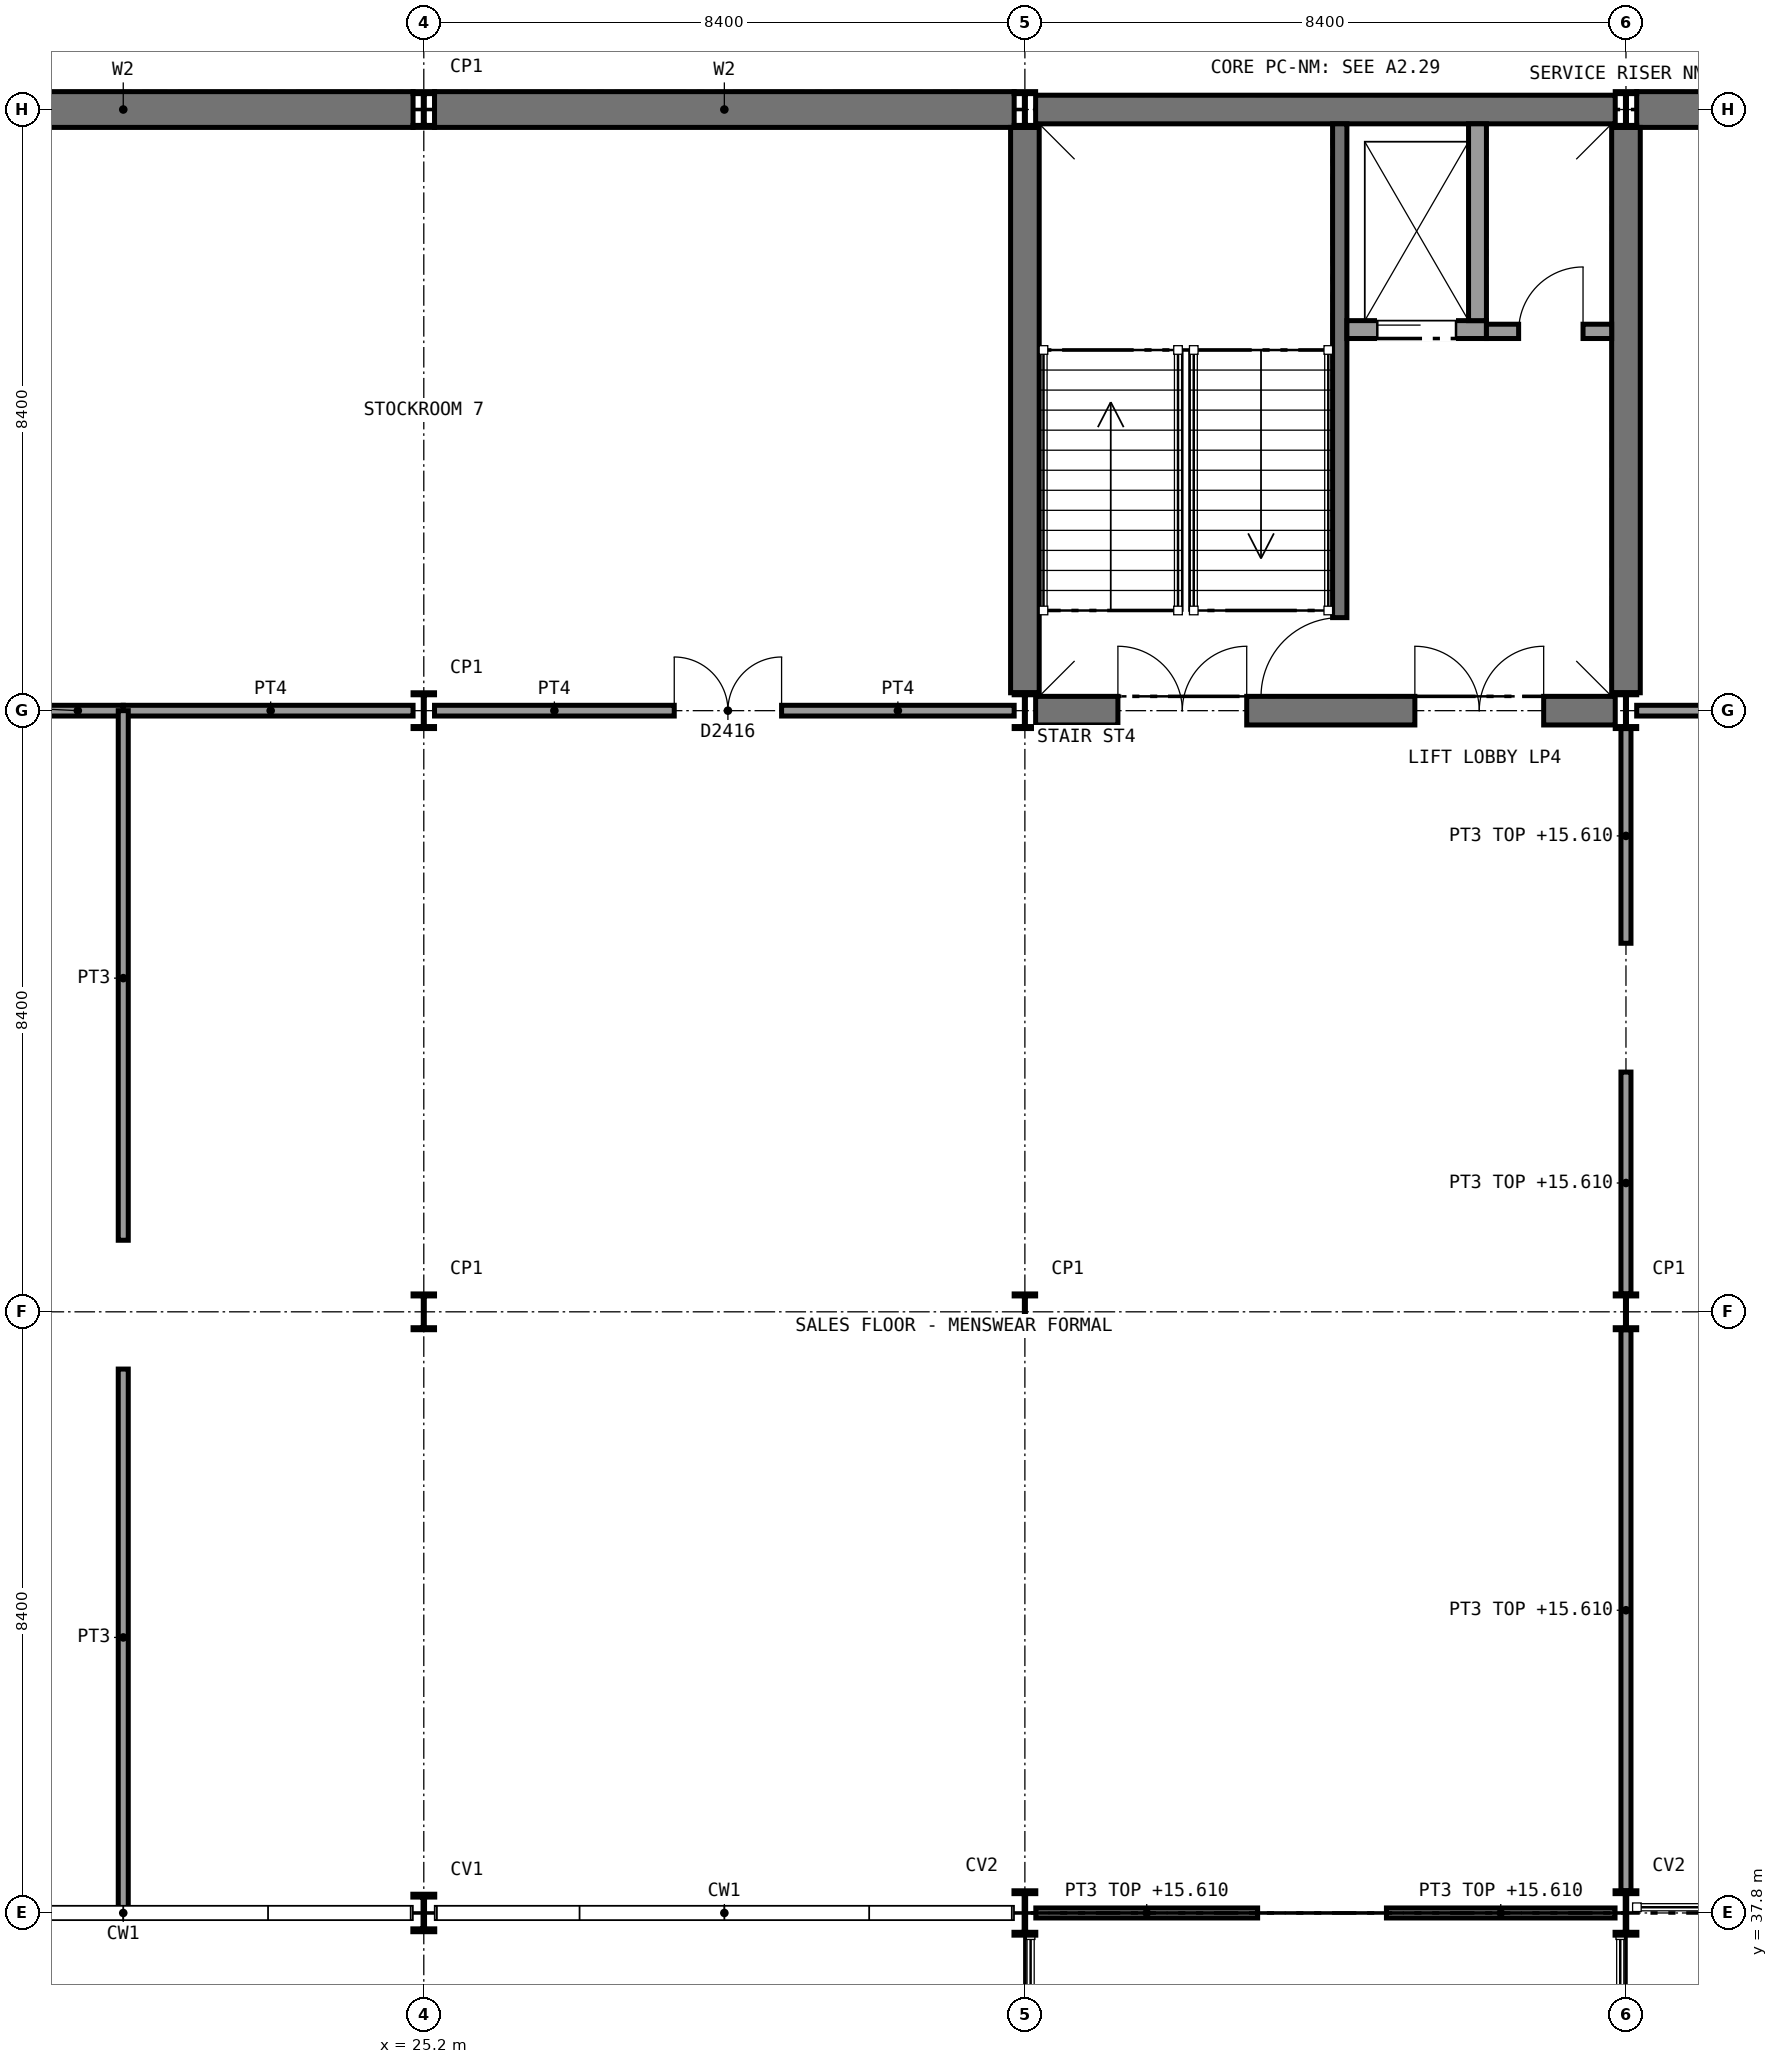
"""IFC4 building model, lengths in metres.
Left out: names, types, materials, properties, quantities, classifications, styles, units other than length and angle.
Written with IfcOpenShell. Run it as: python <this file> out.ifc"""

import sys

from ifc_helpers import new_model, si_unit, direction, frame, frame_2d, origin, origin_2d, place, context, subcontext, project, spatial, rectangle, i_section, extrude, element, fill, save


model = new_model("IFC4")
c1 = context("Model", 3, precision=1e-05, world=origin(), true_north=direction((0.0, 1.0)))
c2 = subcontext(c1, "Body", "Model", "MODEL_VIEW")
j1 = project(units=[si_unit("LENGTHUNIT", "METRE"), si_unit("PLANEANGLEUNIT", "RADIAN")], contexts=[c1])
p1 = place(None, origin())
s1 = spatial("IfcSite", under=j1, at=p1, CompositionType="ELEMENT")
p2 = place(p1, origin())
s2 = spatial("IfcBuilding", under=s1, at=p2, CompositionType="ELEMENT")
p3 = place(p2, frame((0.0, 0.0, 11.4)))
s3 = spatial("IfcBuildingStorey", under=s2, at=p3, CompositionType="ELEMENT", Elevation=11.4)
p4 = place(p3, frame((16.95, 63.0, 0.0), z_axis=(0.0, 0.0, 1.0), x_axis=(1.0, 0.0, 0.0)))
e1 = element("IfcWall", 1, at=p4, inside=s3, PredefinedType="SHEAR", context=c2, shape_type="SweptSolid", body=[
    extrude(rectangle(XDim=8.1, YDim=0.5, at=frame_2d((4.05, 0.0))), origin(), (0.0, 0.0, 1.0), 4.65),
])
p5 = place(p3, frame((25.35, 63.0, 0.0), z_axis=(0.0, 0.0, 1.0), x_axis=(1.0, 0.0, 0.0)))
e2 = element("IfcWall", 2, at=p5, inside=s3, PredefinedType="SHEAR", context=c2, shape_type="SweptSolid", body=[
    extrude(rectangle(XDim=8.1, YDim=0.5, at=frame_2d((4.05, 0.0))), origin(), (0.0, 0.0, 1.0), 4.65),
])
p6 = place(p3, frame((42.15, 63.0, 0.0), z_axis=(0.0, 0.0, 1.0), x_axis=(1.0, 0.0, 0.0)))
e3 = element("IfcWall", 3, at=p6, inside=s3, PredefinedType="SHEAR", context=c2, shape_type="SweptSolid", body=[
    extrude(rectangle(XDim=8.1, YDim=0.5, at=frame_2d((4.05, 0.0))), origin(), (0.0, 0.0, 1.0), 4.65),
])
p7 = place(p3, frame((33.75, 63.0, 0.0), z_axis=(0.0, 0.0, 1.0), x_axis=(1.0, 0.0, 0.0)))
e4 = element("IfcWall", 4, at=p7, inside=s3, PredefinedType="SHEAR", context=c2, shape_type="SweptSolid", body=[
    extrude(rectangle(XDim=8.1, YDim=0.4, at=frame_2d((4.05, 0.0))), origin(), (0.0, 0.0, 1.0), 4.65),
])
p8 = place(p3, frame((33.75, 54.6, 0.0), z_axis=(0.0, 0.0, 1.0), x_axis=(1.0, 0.0, 0.0)))
e5 = element("IfcWall", 5, at=p8, inside=s3, PredefinedType="SHEAR", context=c2, shape_type="SweptSolid", body=[
    extrude(rectangle(XDim=8.1, YDim=0.4, at=frame_2d((4.05, 0.0))), origin(), (0.0, 0.0, 1.0), 4.65),
])
p9 = place(p8, frame((1.15, 0.0, 0.0)))
e6 = element("IfcOpeningElement", 6, at=p9, cuts=e5, PredefinedType="OPENING", context=c2, shape_type="SweptSolid", body=[
    extrude(rectangle(XDim=1.8, YDim=2.1, at=frame_2d((0.9, 1.05))), frame((0.0, 0.21, 0.0), z_axis=(0.0, -1.0, 0.0), x_axis=(1.0, 0.0, 0.0)), (0.0, 0.0, 1.0), 0.42),
])
p10 = place(p8, frame((5.3, 0.0, 0.0)))
e7 = element("IfcOpeningElement", 7, at=p10, cuts=e5, PredefinedType="OPENING", context=c2, shape_type="SweptSolid", body=[
    extrude(rectangle(XDim=1.8, YDim=2.1, at=frame_2d((0.9, 1.05))), frame((0.0, 0.21, 0.0), z_axis=(0.0, -1.0, 0.0), x_axis=(1.0, 0.0, 0.0)), (0.0, 0.0, 1.0), 0.42),
])
for number, where, z_axis, x_axis in (
    (8, (33.6, 54.85, 0.0), (0.0, 0.0, 1.0), (0.0, 1.0, 0.0)),
    (9, (42.0, 54.85, 0.0), (0.0, 0.0, 1.0), (0.0, 1.0, 0.0)),
):
    element("IfcWall", number, at=place(p3, frame(where, z_axis=z_axis, x_axis=x_axis)), inside=s3, PredefinedType="SHEAR", context=c2, shape_type="SweptSolid", body=[
        extrude(rectangle(XDim=7.9, YDim=0.4, at=frame_2d((3.95, 0.0))), origin(), (0.0, 0.0, 1.0), 4.65),
    ])
p11 = place(p3, frame((25.2, 37.8, 0.0), z_axis=(0.0, 0.0, 1.0), x_axis=(1.0, 0.0, 0.0)))
e10 = element("IfcColumn", 10, at=p11, inside=s3, PredefinedType="COLUMN", context=c2, shape_type="SweptSolid", body=[
    extrude(i_section(OverallWidth=0.306, OverallDepth=0.524, WebThickness=0.021, FlangeThickness=0.04, FilletRadius=0.027, at=origin_2d()), origin(), (0.0, 0.0, 1.0), 4.8),
])
for number, where, z_axis, x_axis in (
    (11, (25.2, 46.2, 0.0), (0.0, 0.0, 1.0), (1.0, 0.0, 0.0)),
    (12, (25.2, 54.6, 0.0), (0.0, 0.0, 1.0), (1.0, 0.0, 0.0)),
    (13, (25.2, 63.0, 0.0), (0.0, 0.0, 1.0), (1.0, 0.0, 0.0)),
):
    element("IfcColumn", number, at=place(p3, frame(where, z_axis=z_axis, x_axis=x_axis)), inside=s3, PredefinedType="COLUMN", context=c2, shape_type="SweptSolid", body=[
        extrude(i_section(OverallWidth=0.3, OverallDepth=0.5, WebThickness=0.014, FlangeThickness=0.028, FilletRadius=0.027, at=origin_2d()), origin(), (0.0, 0.0, 1.0), 4.8),
    ])
p12 = place(p3, frame((33.6, 37.8, 0.0), z_axis=(0.0, 0.0, 1.0), x_axis=(1.0, 0.0, 0.0)))
e14 = element("IfcColumn", 14, at=p12, inside=s3, PredefinedType="COLUMN", context=c2, shape_type="SweptSolid", body=[
    extrude(i_section(OverallWidth=0.305, OverallDepth=0.62, WebThickness=0.021, FlangeThickness=0.04, FilletRadius=0.027, at=origin_2d()), origin(), (0.0, 0.0, 1.0), 4.8),
])
for number, where, z_axis, x_axis in (
    (15, (33.6, 46.2, 0.0), (0.0, 0.0, 1.0), (1.0, 0.0, 0.0)),
    (16, (33.6, 54.6, 0.0), (0.0, 0.0, 1.0), (1.0, 0.0, 0.0)),
    (17, (33.6, 63.0, 0.0), (0.0, 0.0, 1.0), (1.0, 0.0, 0.0)),
):
    element("IfcColumn", number, at=place(p3, frame(where, z_axis=z_axis, x_axis=x_axis)), inside=s3, PredefinedType="COLUMN", context=c2, shape_type="SweptSolid", body=[
        extrude(i_section(OverallWidth=0.3, OverallDepth=0.5, WebThickness=0.014, FlangeThickness=0.028, FilletRadius=0.027, at=origin_2d()), origin(), (0.0, 0.0, 1.0), 4.8),
    ])
p13 = place(p3, frame((42.0, 37.8, 0.0), z_axis=(0.0, 0.0, 1.0), x_axis=(1.0, 0.0, 0.0)))
e18 = element("IfcColumn", 18, at=p13, inside=s3, PredefinedType="COLUMN", context=c2, shape_type="SweptSolid", body=[
    extrude(i_section(OverallWidth=0.305, OverallDepth=0.62, WebThickness=0.021, FlangeThickness=0.04, FilletRadius=0.027, at=origin_2d()), origin(), (0.0, 0.0, 1.0), 4.8),
])
for number, where, z_axis, x_axis in (
    (19, (42.0, 46.2, 0.0), (0.0, 0.0, 1.0), (1.0, 0.0, 0.0)),
    (20, (42.0, 54.6, 0.0), (0.0, 0.0, 1.0), (1.0, 0.0, 0.0)),
    (21, (42.0, 63.0, 0.0), (0.0, 0.0, 1.0), (1.0, 0.0, 0.0)),
):
    element("IfcColumn", number, at=place(p3, frame(where, z_axis=z_axis, x_axis=x_axis)), inside=s3, PredefinedType="COLUMN", context=c2, shape_type="SweptSolid", body=[
        extrude(i_section(OverallWidth=0.3, OverallDepth=0.5, WebThickness=0.014, FlangeThickness=0.028, FilletRadius=0.027, at=origin_2d()), origin(), (0.0, 0.0, 1.0), 4.8),
    ])
p14 = place(p3, frame((16.95, 54.6, 0.0), z_axis=(0.0, 0.0, 1.0), x_axis=(1.0, 0.0, 0.0)))
e22 = element("IfcWall", 22, at=p14, inside=s3, PredefinedType="SOLIDWALL", context=c2, shape_type="SweptSolid", body=[
    extrude(rectangle(XDim=4.05, YDim=0.15, at=frame_2d((2.025, 0.0))), origin(), (0.0, 0.0, 1.0), 4.32),
])
p15 = place(p14, frame((1.35, 0.0, 0.0)))
e23 = element("IfcOpeningElement", 23, at=p15, cuts=e22, PredefinedType="OPENING", context=c2, shape_type="SweptSolid", body=[
    extrude(rectangle(XDim=1.5, YDim=2.1, at=frame_2d((0.75, 1.05))), frame((0.0, 0.085, 0.0), z_axis=(0.0, -1.0, 0.0), x_axis=(1.0, 0.0, 0.0)), (0.0, 0.0, 1.0), 0.17),
])
p16 = place(p3, frame((21.0, 54.6, 0.0), z_axis=(0.0, 0.0, 1.0), x_axis=(1.0, 0.0, 0.0)))
e24 = element("IfcWall", 24, at=p16, inside=s3, PredefinedType="SOLIDWALL", context=c2, shape_type="SweptSolid", body=[
    extrude(rectangle(XDim=4.05, YDim=0.15, at=frame_2d((2.025, 0.0))), origin(), (0.0, 0.0, 1.0), 4.32),
])
p17 = place(p3, frame((25.35, 54.6, 0.0), z_axis=(0.0, 0.0, 1.0), x_axis=(1.0, 0.0, 0.0)))
e25 = element("IfcWall", 25, at=p17, inside=s3, PredefinedType="SOLIDWALL", context=c2, shape_type="SweptSolid", body=[
    extrude(rectangle(XDim=8.1, YDim=0.15, at=frame_2d((4.05, 0.0))), origin(), (0.0, 0.0, 1.0), 4.32),
])
p18 = place(p17, frame((3.35, 0.0, 0.0)))
e26 = element("IfcOpeningElement", 26, at=p18, cuts=e25, PredefinedType="OPENING", context=c2, shape_type="SweptSolid", body=[
    extrude(rectangle(XDim=1.5, YDim=2.1, at=frame_2d((0.75, 1.05))), frame((0.0, 0.085, 0.0), z_axis=(0.0, -1.0, 0.0), x_axis=(1.0, 0.0, 0.0)), (0.0, 0.0, 1.0), 0.17),
])
p19 = place(p3, frame((42.15, 54.6, 0.0), z_axis=(0.0, 0.0, 1.0), x_axis=(1.0, 0.0, 0.0)))
e27 = element("IfcWall", 27, at=p19, inside=s3, PredefinedType="SOLIDWALL", context=c2, shape_type="SweptSolid", body=[
    extrude(rectangle(XDim=8.1, YDim=0.15, at=frame_2d((4.05, 0.0))), origin(), (0.0, 0.0, 1.0), 4.32),
])
p20 = place(p19, frame((3.35, 0.0, 0.0)))
e28 = element("IfcOpeningElement", 28, at=p20, cuts=e27, PredefinedType="OPENING", context=c2, shape_type="SweptSolid", body=[
    extrude(rectangle(XDim=1.5, YDim=2.1, at=frame_2d((0.75, 1.05))), frame((0.0, 0.085, 0.0), z_axis=(0.0, -1.0, 0.0), x_axis=(1.0, 0.0, 0.0)), (0.0, 0.0, 1.0), 0.17),
])
p21 = place(p3, frame((21.0, 37.8, 0.0), z_axis=(0.0, 0.0, 1.0), x_axis=(0.0, 1.0, 0.0)))
e29 = element("IfcWall", 29, at=p21, inside=s3, PredefinedType="PARTITIONING", context=c2, shape_type="SweptSolid", body=[
    extrude(rectangle(XDim=7.6, YDim=0.14, at=frame_2d((3.8, 0.0))), origin(), (0.0, 0.0, 1.0), 4.65),
])
p22 = place(p3, frame((21.0, 47.2, 0.0), z_axis=(0.0, 0.0, 1.0), x_axis=(0.0, 1.0, 0.0)))
e30 = element("IfcWall", 30, at=p22, inside=s3, PredefinedType="PARTITIONING", context=c2, shape_type="SweptSolid", body=[
    extrude(rectangle(XDim=7.4, YDim=0.14, at=frame_2d((3.7, 0.0))), origin(), (0.0, 0.0, 1.0), 4.65),
])
p23 = place(p3, frame((42.0, 38.11, 0.0), z_axis=(0.0, 0.0, 1.0), x_axis=(0.0, 1.0, 0.0)))
e31 = element("IfcWall", 31, at=p23, inside=s3, PredefinedType="PARTITIONING", context=c2, shape_type="SweptSolid", body=[
    extrude(rectangle(XDim=7.84, YDim=0.14, at=frame_2d((3.92, 0.0))), origin(), (0.0, 0.0, 1.0), 4.21),
])
p24 = place(p3, frame((42.0, 46.45, 0.0), z_axis=(0.0, 0.0, 1.0), x_axis=(0.0, 1.0, 0.0)))
e32 = element("IfcWall", 32, at=p24, inside=s3, PredefinedType="PARTITIONING", context=c2, shape_type="SweptSolid", body=[
    extrude(rectangle(XDim=3.1, YDim=0.14, at=frame_2d((1.55, 0.0))), origin(), (0.0, 0.0, 1.0), 4.21),
])
p25 = place(p3, frame((42.0, 51.35, 0.0), z_axis=(0.0, 0.0, 1.0), x_axis=(0.0, 1.0, 0.0)))
e33 = element("IfcWall", 33, at=p25, inside=s3, PredefinedType="PARTITIONING", context=c2, shape_type="SweptSolid", body=[
    extrude(rectangle(XDim=3.0, YDim=0.14, at=frame_2d((1.5, 0.0))), origin(), (0.0, 0.0, 1.0), 4.21),
])
p26 = place(p3, frame((33.753, 37.8, 0.0), z_axis=(0.0, 0.0, 1.0), x_axis=(1.0, 0.0, 0.0)))
e34 = element("IfcWall", 34, at=p26, inside=s3, PredefinedType="PARTITIONING", context=c2, shape_type="SweptSolid", body=[
    extrude(rectangle(XDim=3.1, YDim=0.14, at=frame_2d((1.55, 0.0))), origin(), (0.0, 0.0, 1.0), 4.21),
])
p27 = place(p3, frame((38.653, 37.8, 0.0), z_axis=(0.0, 0.0, 1.0), x_axis=(1.0, 0.0, 0.0)))
e35 = element("IfcWall", 35, at=p27, inside=s3, PredefinedType="PARTITIONING", context=c2, shape_type="SweptSolid", body=[
    extrude(rectangle(XDim=3.195, YDim=0.14, at=frame_2d((1.597, 0.0))), origin(), (0.0, 0.0, 1.0), 4.21),
])
p28 = place(p3, frame((38.0, 62.8, 0.0), z_axis=(0.0, 0.0, 1.0), x_axis=(0.0, -1.0, 0.0)))
e36 = element("IfcWall", 36, at=p28, inside=s3, PredefinedType="SHEAR", context=c2, shape_type="SweptSolid", body=[
    extrude(rectangle(XDim=8.0, YDim=0.2, at=frame_2d((4.0, 0.0))), origin(), (0.0, 0.0, 1.0), 4.65),
])
p29 = place(p28, frame((6.9, 0.0, 0.0)))
e37 = element("IfcOpeningElement", 37, at=p29, cuts=e36, PredefinedType="OPENING", context=c2, shape_type="SweptSolid", body=[
    extrude(rectangle(XDim=1.11, YDim=2.1, at=frame_2d((0.555, 1.05))), frame((0.0, 0.11, 0.0), z_axis=(0.0, -1.0, 0.0), x_axis=(1.0, 0.0, 0.0)), (0.0, 0.0, 1.0), 0.22),
])
p30 = place(p3, frame((38.1, 59.925, 0.0), z_axis=(0.0, 0.0, 1.0), x_axis=(1.0, 0.0, 0.0)))
e38 = element("IfcWall", 38, at=p30, inside=s3, PredefinedType="SOLIDWALL", context=c2, shape_type="SweptSolid", body=[
    extrude(rectangle(XDim=1.95, YDim=0.25, at=frame_2d((0.975, 0.0))), origin(), (0.0, 0.0, 1.0), 4.8),
])
p31 = place(p30, frame((0.425, 0.0, 0.0)))
e39 = element("IfcOpeningElement", 39, at=p31, cuts=e38, PredefinedType="OPENING", context=c2, shape_type="SweptSolid", body=[
    extrude(rectangle(XDim=1.1, YDim=2.1, at=frame_2d((0.55, 1.05))), frame((0.0, 0.135, 0.0), z_axis=(0.0, -1.0, 0.0), x_axis=(1.0, 0.0, 0.0)), (0.0, 0.0, 1.0), 0.27),
])
p32 = place(p3, frame((39.925, 62.8, 0.0), z_axis=(0.0, 0.0, 1.0), x_axis=(0.0, -1.0, 0.0)))
e40 = element("IfcWall", 40, at=p32, inside=s3, PredefinedType="SOLIDWALL", context=c2, shape_type="SweptSolid", body=[
    extrude(rectangle(XDim=2.75, YDim=0.25, at=frame_2d((1.375, 0.0))), origin(), (0.0, 0.0, 1.0), 4.8),
])
p33 = place(p3, frame((40.05, 59.9, 0.0), z_axis=(0.0, 0.0, 1.0), x_axis=(1.0, 0.0, 0.0)))
e41 = element("IfcWall", 41, at=p33, inside=s3, PredefinedType="PARTITIONING", context=c2, shape_type="SweptSolid", body=[
    extrude(rectangle(XDim=1.75, YDim=0.2, at=frame_2d((0.875, 0.0))), origin(), (0.0, 0.0, 1.0), 4.65),
])
p34 = place(p33, frame((0.45, 0.0, 0.0)))
e42 = element("IfcOpeningElement", 42, at=p34, cuts=e41, PredefinedType="OPENING", context=c2, shape_type="SweptSolid", body=[
    extrude(rectangle(XDim=0.9, YDim=2.1, at=frame_2d((0.45, 1.05))), frame((0.0, 0.11, 0.0), z_axis=(0.0, -1.0, 0.0), x_axis=(1.0, 0.0, 0.0)), (0.0, 0.0, 1.0), 0.22),
])
p35 = place(p18, origin())
e43 = element("IfcDoor", 43, at=p35, inside=s3, OperationType="DOUBLE_DOOR_SINGLE_SWING", PredefinedType="DOOR", context=c2, shape_type="SweptSolid", body=[
    extrude(rectangle(XDim=1.5, YDim=2.1, at=frame_2d((0.75, 1.05))), frame((0.0, 0.025, 0.0), z_axis=(0.0, -1.0, 0.0), x_axis=(1.0, 0.0, 0.0)), (0.0, 0.0, 1.0), 0.05),
])
fill(e26, e43)
p36 = place(p29, frame((1.1, 0.0, 0.0), z_axis=(0.0, 0.0, 1.0), x_axis=(-1.0, 0.0, 0.0)))
e44 = element("IfcDoor", 44, at=p36, inside=s3, OperationType="SINGLE_SWING_LEFT", PredefinedType="DOOR", context=c2, shape_type="SweptSolid", body=[
    extrude(rectangle(XDim=1.1, YDim=2.1, at=frame_2d((0.55, 1.05))), frame((0.0, 0.025, 0.0), z_axis=(0.0, -1.0, 0.0), x_axis=(1.0, 0.0, 0.0)), (0.0, 0.0, 1.0), 0.05),
])
fill(e37, e44)
p37 = place(p31, frame((1.1, 0.0, 0.0), z_axis=(0.0, 0.0, 1.0), x_axis=(-1.0, 0.0, 0.0)))
e45 = element("IfcDoor", 45, at=p37, inside=s3, OperationType="SLIDING_TO_RIGHT", PredefinedType="DOOR", context=c2, shape_type="SweptSolid", body=[
    extrude(rectangle(XDim=1.1, YDim=2.1, at=frame_2d((0.55, 1.05))), frame((0.0, 0.025, 0.0), z_axis=(0.0, -1.0, 0.0), x_axis=(1.0, 0.0, 0.0)), (0.0, 0.0, 1.0), 0.05),
])
fill(e39, e45)
p38 = place(p34, origin())
e46 = element("IfcDoor", 46, at=p38, inside=s3, OperationType="SINGLE_SWING_RIGHT", PredefinedType="DOOR", context=c2, shape_type="SweptSolid", body=[
    extrude(rectangle(XDim=0.9, YDim=2.1, at=frame_2d((0.45, 1.05))), frame((0.0, 0.025, 0.0), z_axis=(0.0, -1.0, 0.0), x_axis=(1.0, 0.0, 0.0)), (0.0, 0.0, 1.0), 0.05),
])
fill(e42, e46)
p39 = place(p9, origin())
e47 = element("IfcDoor", 47, at=p39, inside=s3, OperationType="DOUBLE_DOOR_SINGLE_SWING", PredefinedType="DOOR", context=c2, shape_type="SweptSolid", body=[
    extrude(rectangle(XDim=1.8, YDim=2.1, at=frame_2d((0.9, 1.05))), frame((0.0, 0.025, 0.0), z_axis=(0.0, -1.0, 0.0), x_axis=(1.0, 0.0, 0.0)), (0.0, 0.0, 1.0), 0.05),
])
fill(e6, e47)
p40 = place(p10, origin())
e48 = element("IfcDoor", 48, at=p40, inside=s3, OperationType="DOUBLE_DOOR_SINGLE_SWING", PredefinedType="DOOR", context=c2, shape_type="SweptSolid", body=[
    extrude(rectangle(XDim=1.8, YDim=2.1, at=frame_2d((0.9, 1.05))), frame((0.0, 0.025, 0.0), z_axis=(0.0, -1.0, 0.0), x_axis=(1.0, 0.0, 0.0)), (0.0, 0.0, 1.0), 0.05),
])
fill(e7, e48)
save(model, sys.argv[1])
